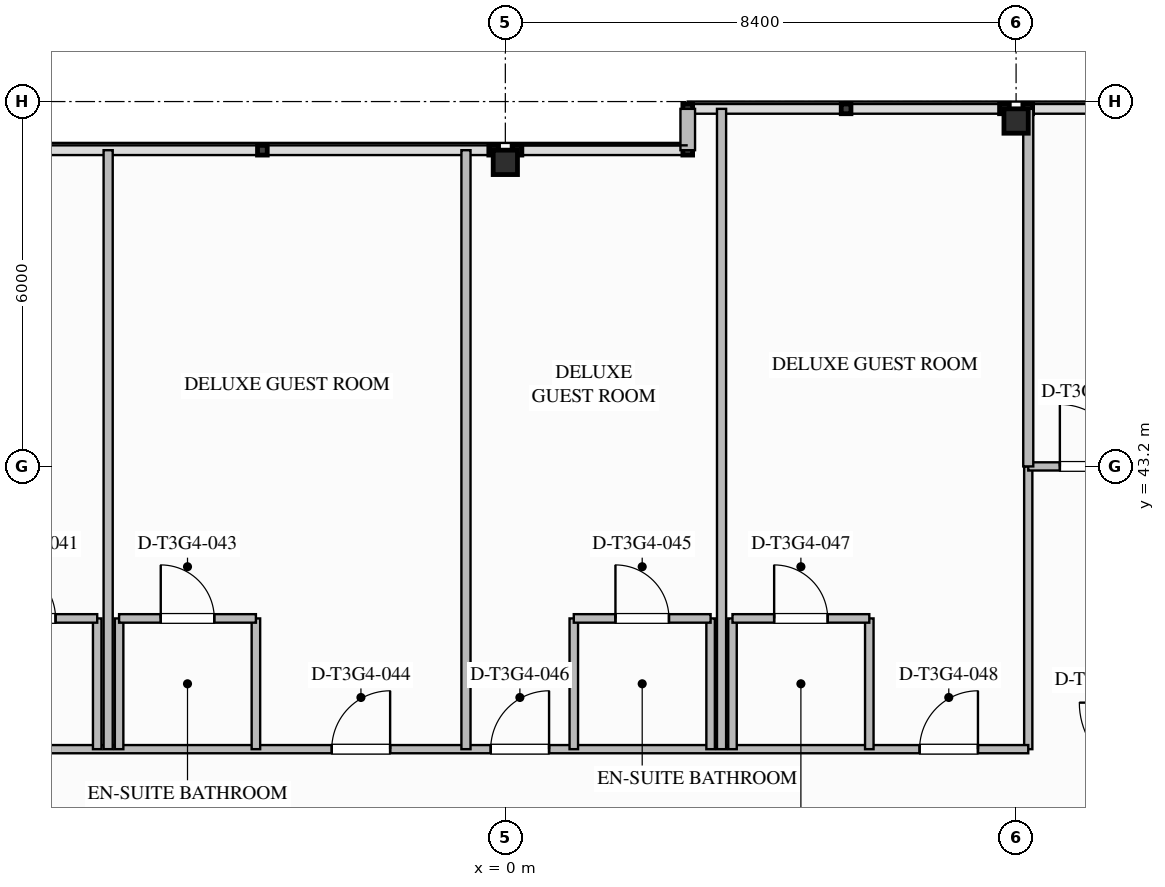
"""IFC4 building model, lengths in metres.
Left out: names, types, materials, properties, quantities, classifications, styles, units other than length and angle.
Written with IfcOpenShell. Run it as: python <this file> out.ifc"""

import sys

from ifc_helpers import new_model, si_unit, direction, frame, frame_2d, origin, origin_2d, place, context, subcontext, project, spatial, rectangle, i_section, extrude, element, fill, save


model = new_model("IFC4")
c1 = context("Model", 3, precision=1e-05, world=origin(), true_north=direction((0.0, 1.0)))
c2 = subcontext(c1, "Body", "Model", "MODEL_VIEW")
j1 = project(units=[si_unit("LENGTHUNIT", "METRE"), si_unit("PLANEANGLEUNIT", "RADIAN")], contexts=[c1])
p1 = place(None, origin())
s1 = spatial("IfcSite", under=j1, at=p1, CompositionType="ELEMENT")
p2 = place(p1, origin())
s2 = spatial("IfcBuilding", under=s1, at=p2, CompositionType="ELEMENT")
p3 = place(p2, frame((0.0, 0.0, 182.35)))
s3 = spatial("IfcBuildingStorey", under=s2, at=p3, CompositionType="ELEMENT", Elevation=182.35)
for number, where, z_axis, x_axis in (
    (1, (0.0, 48.2, 0.0), (0.0, 0.0, 1.0), (0.0, 1.0, 0.0)),
    (2, (8.4, 48.88, 0.0), (0.0, 0.0, 1.0), (0.0, 1.0, 0.0)),
):
    element("IfcColumn", number, at=place(p3, frame(where, z_axis=z_axis, x_axis=x_axis)), inside=s3, PredefinedType="COLUMN", context=c2, shape_type="SweptSolid", body=[
        extrude(i_section(OverallWidth=0.401, OverallDepth=0.399, WebThickness=0.025, FlangeThickness=0.04, FilletRadius=0.025, at=origin_2d()), origin(), (0.0, 0.0, 1.0), 3.547),
    ])
p4 = place(p3, frame((3.0, 48.4, 0.0), z_axis=(0.0, 0.0, 1.0), x_axis=(0.0, 1.0, 0.0)))
e3 = element("IfcWall", 3, at=p4, inside=s3, PredefinedType="STANDARD", context=c2, shape_type="SweptSolid", body=[
    extrude(rectangle(XDim=0.68, YDim=0.24, at=frame_2d((0.34, 0.0))), origin(), (0.0, 0.0, 1.0), 3.29),
])
p5 = place(p3, frame((8.6, 38.55, 0.0), z_axis=(0.0, 0.0, 1.0), x_axis=(0.0, 1.0, 0.0)))
e4 = element("IfcWall", 4, at=p5, inside=s3, PredefinedType="PARTITIONING", context=c2, shape_type="SweptSolid", body=[
    extrude(rectangle(XDim=4.65, YDim=0.135, at=frame_2d((2.325, 0.0))), origin(), (0.0, 0.0, 1.0), 2.667),
])
p6 = place(p3, frame((-16.2, 38.55, 0.0), z_axis=(0.0, 0.0, 1.0), x_axis=(1.0, 0.0, 0.0)))
e5 = element("IfcWall", 5, at=p6, inside=s3, PredefinedType="PARTITIONING", context=c2, shape_type="SweptSolid", body=[
    extrude(rectangle(XDim=24.8, YDim=0.135, at=frame_2d((12.4, 0.0))), origin(), (0.0, 0.0, 1.0), 3.29),
])
p7 = place(p6, frame((3.467, 0.0, 0.0)))
e6 = element("IfcOpeningElement", 6, at=p7, cuts=e5, PredefinedType="OPENING", context=c2, shape_type="SweptSolid", body=[
    extrude(rectangle(XDim=0.96, YDim=2.15, at=frame_2d((0.48, 1.075))), frame((0.0, 0.077, 0.0), z_axis=(0.0, -1.0, 0.0), x_axis=(1.0, 0.0, 0.0)), (0.0, 0.0, 1.0), 0.155),
])
p8 = place(p6, frame((5.871, 0.0, 0.0)))
e7 = element("IfcOpeningElement", 7, at=p8, cuts=e5, PredefinedType="OPENING", context=c2, shape_type="SweptSolid", body=[
    extrude(rectangle(XDim=0.96, YDim=2.15, at=frame_2d((0.48, 1.075))), frame((0.0, 0.077, 0.0), z_axis=(0.0, -1.0, 0.0), x_axis=(1.0, 0.0, 0.0)), (0.0, 0.0, 1.0), 0.155),
])
p9 = place(p6, frame((13.345, 0.0, 0.0)))
e8 = element("IfcOpeningElement", 8, at=p9, cuts=e5, PredefinedType="OPENING", context=c2, shape_type="SweptSolid", body=[
    extrude(rectangle(XDim=0.96, YDim=2.15, at=frame_2d((0.48, 1.075))), frame((0.0, 0.077, 0.0), z_axis=(0.0, -1.0, 0.0), x_axis=(1.0, 0.0, 0.0)), (0.0, 0.0, 1.0), 0.155),
])
p10 = place(p6, frame((15.959, 0.0, 0.0)))
e9 = element("IfcOpeningElement", 9, at=p10, cuts=e5, PredefinedType="OPENING", context=c2, shape_type="SweptSolid", body=[
    extrude(rectangle(XDim=0.96, YDim=2.15, at=frame_2d((0.48, 1.075))), frame((0.0, 0.077, 0.0), z_axis=(0.0, -1.0, 0.0), x_axis=(1.0, 0.0, 0.0)), (0.0, 0.0, 1.0), 0.155),
])
p11 = place(p6, frame((23.013, 0.0, 0.0)))
e10 = element("IfcOpeningElement", 10, at=p11, cuts=e5, PredefinedType="OPENING", context=c2, shape_type="SweptSolid", body=[
    extrude(rectangle(XDim=0.96, YDim=2.15, at=frame_2d((0.48, 1.075))), frame((0.0, 0.077, 0.0), z_axis=(0.0, -1.0, 0.0), x_axis=(1.0, 0.0, 0.0)), (0.0, 0.0, 1.0), 0.155),
])
p12 = place(p3, frame((8.6, 43.2, 0.0), z_axis=(0.0, 0.0, 1.0), x_axis=(1.0, 0.0, 0.0)))
e11 = element("IfcWall", 11, at=p12, inside=s3, PredefinedType="PARTITIONING", context=c2, shape_type="SweptSolid", body=[
    extrude(rectangle(XDim=2.1, YDim=0.135, at=frame_2d((1.05, 0.0))), origin(), (0.0, 0.0, 1.0), 2.579),
])
p13 = place(p12, frame((0.52, 0.0, 0.0)))
e12 = element("IfcOpeningElement", 12, at=p13, cuts=e11, PredefinedType="OPENING", context=c2, shape_type="SweptSolid", body=[
    extrude(rectangle(XDim=1.02, YDim=2.15, at=frame_2d((0.51, 1.075))), frame((0.0, 0.077, 0.0), z_axis=(0.0, -1.0, 0.0), x_axis=(1.0, 0.0, 0.0)), (0.0, 0.0, 1.0), 0.155),
])
p14 = place(p3, frame((8.6, 43.2, 0.0), z_axis=(0.0, 0.0, 1.0), x_axis=(0.0, 1.0, 0.0)))
e13 = element("IfcWall", 13, at=p14, inside=s3, PredefinedType="PARTITIONING", context=c2, shape_type="SweptSolid", body=[
    extrude(rectangle(XDim=5.88, YDim=0.165, at=frame_2d((2.94, 0.0))), origin(), (0.0, 0.0, 1.0), 2.579),
])
p15 = place(p3, frame((-6.712, 38.55, 0.0), z_axis=(0.0, 0.0, 1.0), x_axis=(0.0, 1.0, 0.0)))
e14 = element("IfcWall", 14, at=p15, inside=s3, PredefinedType="PLUMBINGWALL", context=c2, shape_type="SweptSolid", body=[
    extrude(rectangle(XDim=2.15, YDim=0.14, at=frame_2d((1.075, 0.0))), origin(), (0.0, 0.0, 1.0), 3.29),
])
p16 = place(p3, frame((-8.962, 40.7, 0.0), z_axis=(0.0, 0.0, 1.0), x_axis=(1.0, 0.0, 0.0)))
e15 = element("IfcWall", 15, at=p16, inside=s3, PredefinedType="PLUMBINGWALL", context=c2, shape_type="SweptSolid", body=[
    extrude(rectangle(XDim=2.25, YDim=0.14, at=frame_2d((1.125, 0.0))), origin(), (0.0, 0.0, 1.0), 3.29),
])
p17 = place(p16, frame((0.685, 0.0, 0.0)))
e16 = element("IfcOpeningElement", 16, at=p17, cuts=e15, PredefinedType="OPENING", context=c2, shape_type="SweptSolid", body=[
    extrude(rectangle(XDim=0.88, YDim=2.1, at=frame_2d((0.44, 1.05))), frame((0.0, 0.08, 0.0), z_axis=(0.0, -1.0, 0.0), x_axis=(1.0, 0.0, 0.0)), (0.0, 0.0, 1.0), 0.16),
])
p18 = place(p3, frame((-6.532, 38.55, 0.0), z_axis=(0.0, 0.0, 1.0), x_axis=(0.0, 1.0, 0.0)))
e17 = element("IfcWall", 17, at=p18, inside=s3, PredefinedType="PARTITIONING", context=c2, shape_type="SweptSolid", body=[
    extrude(rectangle(XDim=9.85, YDim=0.15, at=frame_2d((4.925, 0.0))), origin(), (0.0, 0.0, 1.0), 3.29),
])
for number, where, z_axis, x_axis in (
    (18, (-6.352, 38.55, 0.0), (0.0, 0.0, 1.0), (0.0, 1.0, 0.0)),
    (19, (-4.102, 38.55, 0.0), (0.0, 0.0, 1.0), (0.0, 1.0, 0.0)),
):
    element("IfcWall", number, at=place(p3, frame(where, z_axis=z_axis, x_axis=x_axis)), inside=s3, PredefinedType="PLUMBINGWALL", context=c2, shape_type="SweptSolid", body=[
        extrude(rectangle(XDim=2.15, YDim=0.14, at=frame_2d((1.075, 0.0))), origin(), (0.0, 0.0, 1.0), 3.29),
    ])
p19 = place(p3, frame((-6.352, 40.7, 0.0), z_axis=(0.0, 0.0, 1.0), x_axis=(1.0, 0.0, 0.0)))
e20 = element("IfcWall", 20, at=p19, inside=s3, PredefinedType="PLUMBINGWALL", context=c2, shape_type="SweptSolid", body=[
    extrude(rectangle(XDim=2.25, YDim=0.14, at=frame_2d((1.125, 0.0))), origin(), (0.0, 0.0, 1.0), 3.29),
])
p20 = place(p19, frame((0.685, 0.0, 0.0)))
e21 = element("IfcOpeningElement", 21, at=p20, cuts=e20, PredefinedType="OPENING", context=c2, shape_type="SweptSolid", body=[
    extrude(rectangle(XDim=0.88, YDim=2.1, at=frame_2d((0.44, 1.05))), frame((0.0, 0.08, 0.0), z_axis=(0.0, -1.0, 0.0), x_axis=(1.0, 0.0, 0.0)), (0.0, 0.0, 1.0), 0.16),
])
p21 = place(p3, frame((-0.647, 38.55, 0.0), z_axis=(0.0, 0.0, 1.0), x_axis=(0.0, 1.0, 0.0)))
e22 = element("IfcWall", 22, at=p21, inside=s3, PredefinedType="PARTITIONING", context=c2, shape_type="SweptSolid", body=[
    extrude(rectangle(XDim=9.85, YDim=0.15, at=frame_2d((4.925, 0.0))), origin(), (0.0, 0.0, 1.0), 3.29),
])
for number, where, z_axis, x_axis in (
    (23, (1.126, 38.55, 0.0), (0.0, 0.0, 1.0), (0.0, 1.0, 0.0)),
    (24, (3.376, 38.55, 0.0), (0.0, 0.0, 1.0), (0.0, 1.0, 0.0)),
):
    element("IfcWall", number, at=place(p3, frame(where, z_axis=z_axis, x_axis=x_axis)), inside=s3, PredefinedType="PLUMBINGWALL", context=c2, shape_type="SweptSolid", body=[
        extrude(rectangle(XDim=2.15, YDim=0.14, at=frame_2d((1.075, 0.0))), origin(), (0.0, 0.0, 1.0), 3.29),
    ])
p22 = place(p3, frame((1.126, 40.7, 0.0), z_axis=(0.0, 0.0, 1.0), x_axis=(1.0, 0.0, 0.0)))
e25 = element("IfcWall", 25, at=p22, inside=s3, PredefinedType="PLUMBINGWALL", context=c2, shape_type="SweptSolid", body=[
    extrude(rectangle(XDim=2.25, YDim=0.14, at=frame_2d((1.125, 0.0))), origin(), (0.0, 0.0, 1.0), 3.29),
])
p23 = place(p22, frame((0.685, 0.0, 0.0)))
e26 = element("IfcOpeningElement", 26, at=p23, cuts=e25, PredefinedType="OPENING", context=c2, shape_type="SweptSolid", body=[
    extrude(rectangle(XDim=0.88, YDim=2.1, at=frame_2d((0.44, 1.05))), frame((0.0, 0.08, 0.0), z_axis=(0.0, -1.0, 0.0), x_axis=(1.0, 0.0, 0.0)), (0.0, 0.0, 1.0), 0.16),
])
p24 = place(p3, frame((3.556, 38.55, 0.0), z_axis=(0.0, 0.0, 1.0), x_axis=(0.0, 1.0, 0.0)))
e27 = element("IfcWall", 27, at=p24, inside=s3, PredefinedType="PARTITIONING", context=c2, shape_type="SweptSolid", body=[
    extrude(rectangle(XDim=10.53, YDim=0.15, at=frame_2d((5.265, 0.0))), origin(), (0.0, 0.0, 1.0), 3.29),
])
for number, where, z_axis, x_axis in (
    (28, (3.736, 38.55, 0.0), (0.0, 0.0, 1.0), (0.0, 1.0, 0.0)),
    (29, (5.986, 38.55, 0.0), (0.0, 0.0, 1.0), (0.0, 1.0, 0.0)),
):
    element("IfcWall", number, at=place(p3, frame(where, z_axis=z_axis, x_axis=x_axis)), inside=s3, PredefinedType="PLUMBINGWALL", context=c2, shape_type="SweptSolid", body=[
        extrude(rectangle(XDim=2.15, YDim=0.14, at=frame_2d((1.075, 0.0))), origin(), (0.0, 0.0, 1.0), 3.29),
    ])
p25 = place(p3, frame((3.736, 40.7, 0.0), z_axis=(0.0, 0.0, 1.0), x_axis=(1.0, 0.0, 0.0)))
e30 = element("IfcWall", 30, at=p25, inside=s3, PredefinedType="PLUMBINGWALL", context=c2, shape_type="SweptSolid", body=[
    extrude(rectangle(XDim=2.25, YDim=0.14, at=frame_2d((1.125, 0.0))), origin(), (0.0, 0.0, 1.0), 3.29),
])
p26 = place(p25, frame((0.685, 0.0, 0.0)))
e31 = element("IfcOpeningElement", 31, at=p26, cuts=e30, PredefinedType="OPENING", context=c2, shape_type="SweptSolid", body=[
    extrude(rectangle(XDim=0.88, YDim=2.1, at=frame_2d((0.44, 1.05))), frame((0.0, 0.08, 0.0), z_axis=(0.0, -1.0, 0.0), x_axis=(1.0, 0.0, 0.0)), (0.0, 0.0, 1.0), 0.16),
])
p27 = place(p13, origin())
e32 = element("IfcDoor", 32, at=p27, inside=s3, OperationType="SINGLE_SWING_LEFT", PredefinedType="DOOR", context=c2, shape_type="SweptSolid", body=[
    extrude(rectangle(XDim=1.02, YDim=2.15, at=frame_2d((0.51, 1.075))), frame((0.0, 0.025, 0.0), z_axis=(0.0, -1.0, 0.0), x_axis=(1.0, 0.0, 0.0)), (0.0, 0.0, 1.0), 0.05),
])
fill(e12, e32)
p28 = place(p17, origin())
e33 = element("IfcDoor", 33, at=p28, inside=s3, OperationType="SINGLE_SWING_LEFT", PredefinedType="DOOR", context=c2, shape_type="SweptSolid", body=[
    extrude(rectangle(XDim=0.88, YDim=2.1, at=frame_2d((0.44, 1.05))), frame((0.0, 0.025, 0.0), z_axis=(0.0, -1.0, 0.0), x_axis=(1.0, 0.0, 0.0)), (0.0, 0.0, 1.0), 0.05),
])
fill(e16, e33)
p29 = place(p20, origin())
e34 = element("IfcDoor", 34, at=p29, inside=s3, OperationType="SINGLE_SWING_LEFT", PredefinedType="DOOR", context=c2, shape_type="SweptSolid", body=[
    extrude(rectangle(XDim=0.88, YDim=2.1, at=frame_2d((0.44, 1.05))), frame((0.0, 0.025, 0.0), z_axis=(0.0, -1.0, 0.0), x_axis=(1.0, 0.0, 0.0)), (0.0, 0.0, 1.0), 0.05),
])
fill(e21, e34)
p30 = place(p9, origin())
e35 = element("IfcDoor", 35, at=p30, inside=s3, OperationType="SINGLE_SWING_RIGHT", PredefinedType="DOOR", context=c2, shape_type="SweptSolid", body=[
    extrude(rectangle(XDim=0.96, YDim=2.15, at=frame_2d((0.48, 1.075))), frame((0.0, 0.025, 0.0), z_axis=(0.0, -1.0, 0.0), x_axis=(1.0, 0.0, 0.0)), (0.0, 0.0, 1.0), 0.05),
])
fill(e8, e35)
p31 = place(p23, origin())
e36 = element("IfcDoor", 36, at=p31, inside=s3, OperationType="SINGLE_SWING_LEFT", PredefinedType="DOOR", context=c2, shape_type="SweptSolid", body=[
    extrude(rectangle(XDim=0.88, YDim=2.1, at=frame_2d((0.44, 1.05))), frame((0.0, 0.025, 0.0), z_axis=(0.0, -1.0, 0.0), x_axis=(1.0, 0.0, 0.0)), (0.0, 0.0, 1.0), 0.05),
])
fill(e26, e36)
p32 = place(p10, origin())
e37 = element("IfcDoor", 37, at=p32, inside=s3, OperationType="SINGLE_SWING_RIGHT", PredefinedType="DOOR", context=c2, shape_type="SweptSolid", body=[
    extrude(rectangle(XDim=0.96, YDim=2.15, at=frame_2d((0.48, 1.075))), frame((0.0, 0.025, 0.0), z_axis=(0.0, -1.0, 0.0), x_axis=(1.0, 0.0, 0.0)), (0.0, 0.0, 1.0), 0.05),
])
fill(e9, e37)
p33 = place(p26, origin())
e38 = element("IfcDoor", 38, at=p33, inside=s3, OperationType="SINGLE_SWING_LEFT", PredefinedType="DOOR", context=c2, shape_type="SweptSolid", body=[
    extrude(rectangle(XDim=0.88, YDim=2.1, at=frame_2d((0.44, 1.05))), frame((0.0, 0.025, 0.0), z_axis=(0.0, -1.0, 0.0), x_axis=(1.0, 0.0, 0.0)), (0.0, 0.0, 1.0), 0.05),
])
fill(e31, e38)
p34 = place(p11, origin())
e39 = element("IfcDoor", 39, at=p34, inside=s3, OperationType="SINGLE_SWING_RIGHT", PredefinedType="DOOR", context=c2, shape_type="SweptSolid", body=[
    extrude(rectangle(XDim=0.96, YDim=2.15, at=frame_2d((0.48, 1.075))), frame((0.0, 0.025, 0.0), z_axis=(0.0, -1.0, 0.0), x_axis=(1.0, 0.0, 0.0)), (0.0, 0.0, 1.0), 0.05),
])
fill(e10, e39)
save(model, sys.argv[1])
